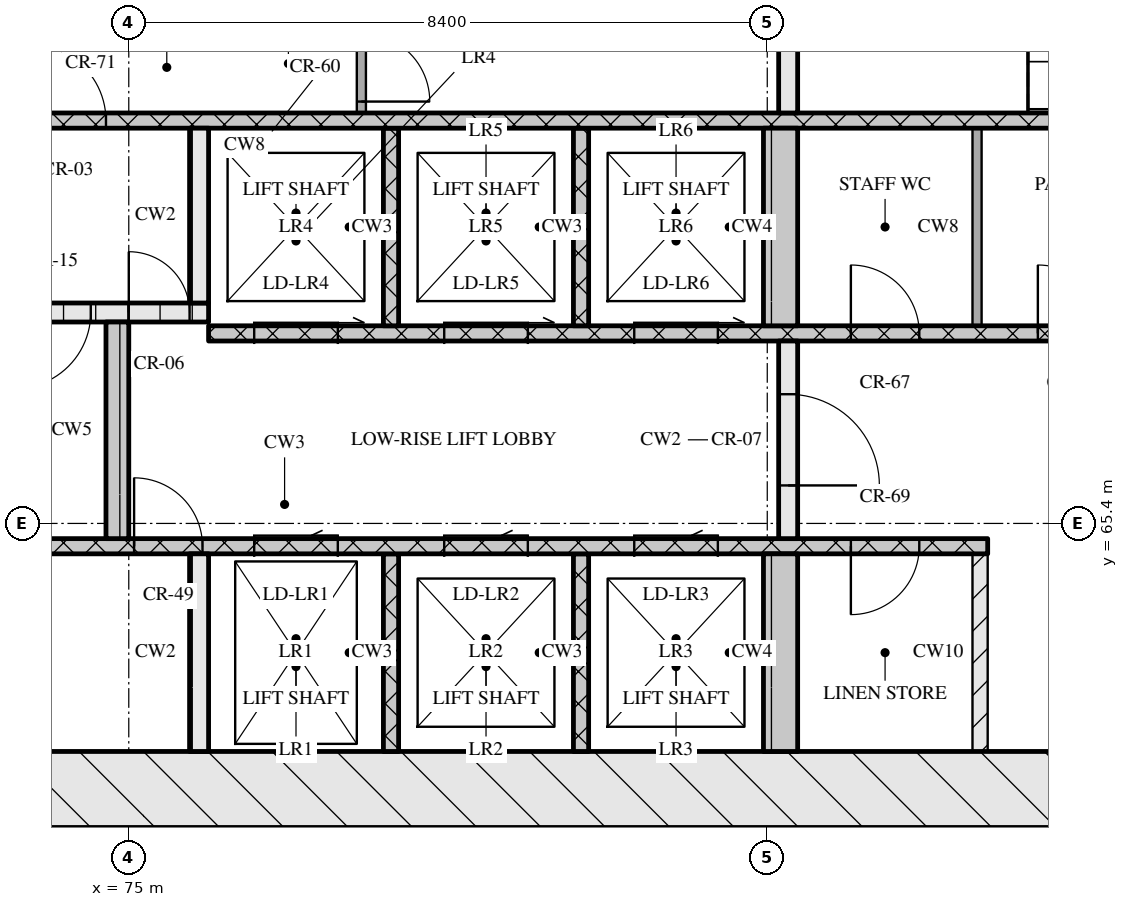
"""IFC4 building model, lengths in metres.
Left out: names, types, materials, properties, quantities, classifications, styles, units other than length and angle.
Written with IfcOpenShell. Run it as: python <this file> out.ifc"""

import sys

from ifc_helpers import new_model, si_unit, direction, frame, frame_2d, origin, place, context, subcontext, project, spatial, rectangle, extrude, element, fill, save


model = new_model("IFC4")
c1 = context("Model", 3, precision=1e-05, world=origin(), true_north=direction((0.0, 1.0)))
c2 = subcontext(c1, "Body", "Model", "MODEL_VIEW")
j1 = project(units=[si_unit("LENGTHUNIT", "METRE"), si_unit("PLANEANGLEUNIT", "RADIAN")], contexts=[c1])
p1 = place(None, origin())
s1 = spatial("IfcSite", under=j1, at=p1, CompositionType="ELEMENT")
p2 = place(p1, origin())
s2 = spatial("IfcBuilding", under=s1, at=p2, CompositionType="ELEMENT")
p3 = place(p2, frame((0.0, 0.0, 134.85)))
s3 = spatial("IfcBuildingStorey", under=s2, at=p3, CompositionType="ELEMENT", Elevation=134.85)
p4 = place(p3, frame((66.8, 61.9, 0.0), z_axis=(0.0, 0.0, 1.0), x_axis=(1.0, 0.0, 0.0)))
e1 = element("IfcWall", 1, at=p4, inside=s3, PredefinedType="SOLIDWALL", context=c2, shape_type="SweptSolid", body=[
    extrude(rectangle(XDim=41.6, YDim=1.0, at=frame_2d((20.8, 0.0))), origin(), (0.0, 0.0, 1.0), 3.32),
])
p5 = place(p4, frame((21.15, 0.0, 0.0)))
e2 = element("IfcOpeningElement", 2, at=p5, cuts=e1, PredefinedType="OPENING", context=c2, shape_type="SweptSolid", body=[
    extrude(rectangle(XDim=1.8, YDim=2.1, at=frame_2d((0.9, 1.05))), frame((0.0, 0.51, 0.0), z_axis=(0.0, -1.0, 0.0), x_axis=(1.0, 0.0, 0.0)), (0.0, 0.0, 1.0), 1.02),
])
p6 = place(p3, frame((75.925, 62.4, 0.0), z_axis=(0.0, 0.0, 1.0), x_axis=(0.0, 1.0, 0.0)))
e3 = element("IfcWall", 3, at=p6, inside=s3, PredefinedType="SOLIDWALL", context=c2, shape_type="SweptSolid", body=[
    extrude(rectangle(XDim=2.6, YDim=0.25, at=frame_2d((1.3, 0.0))), origin(), (0.0, 0.0, 1.0), 3.32),
])
for number, where, z_axis, x_axis in (
    (4, (78.45, 62.4, 0.0), (0.0, 0.0, 1.0), (0.0, 1.0, 0.0)),
    (5, (80.95, 62.4, 0.0), (0.0, 0.0, 1.0), (0.0, 1.0, 0.0)),
):
    element("IfcWall", number, at=place(p3, frame(where, z_axis=z_axis, x_axis=x_axis)), inside=s3, PredefinedType="SOLIDWALL", context=c2, shape_type="SweptSolid", body=[
        extrude(rectangle(XDim=2.6, YDim=0.2, at=frame_2d((1.3, 0.0))), origin(), (0.0, 0.0, 1.0), 3.32),
    ])
p7 = place(p3, frame((83.575, 62.4, 0.0), z_axis=(0.0, 0.0, 1.0), x_axis=(0.0, 1.0, 0.0)))
e6 = element("IfcWall", 6, at=p7, inside=s3, PredefinedType="SOLIDWALL", context=c2, shape_type="SweptSolid", body=[
    extrude(rectangle(XDim=2.6, YDim=0.45, at=frame_2d((1.3, 0.0))), origin(), (0.0, 0.0, 1.0), 3.32),
])
p8 = place(p3, frame((86.2, 62.4, 0.0), z_axis=(0.0, 0.0, 1.0), x_axis=(0.0, 1.0, 0.0)))
e7 = element("IfcWall", 7, at=p8, inside=s3, PredefinedType="PARTITIONING", context=c2, shape_type="SweptSolid", body=[
    extrude(rectangle(XDim=2.6, YDim=0.2, at=frame_2d((1.3, 0.0))), origin(), (0.0, 0.0, 1.0), 3.32),
])
p9 = place(p3, frame((67.8, 65.1, 0.0), z_axis=(0.0, 0.0, 1.0), x_axis=(1.0, 0.0, 0.0)))
e8 = element("IfcWall", 8, at=p9, inside=s3, PredefinedType="SOLIDWALL", context=c2, shape_type="SweptSolid", body=[
    extrude(rectangle(XDim=18.5, YDim=0.2, at=frame_2d((9.25, 0.0))), origin(), (0.0, 0.0, 1.0), 3.32),
])
p10 = place(p9, frame((7.27, 0.0, 0.0)))
e9 = element("IfcOpeningElement", 9, at=p10, cuts=e8, PredefinedType="OPENING", context=c2, shape_type="SweptSolid", body=[
    extrude(rectangle(XDim=0.9, YDim=2.1, at=frame_2d((0.45, 1.05))), frame((0.0, 0.11, 0.0), z_axis=(0.0, -1.0, 0.0), x_axis=(1.0, 0.0, 0.0)), (0.0, 0.0, 1.0), 0.22),
])
p11 = place(p9, frame((8.85, 0.0, 0.0)))
e10 = element("IfcOpeningElement", 10, at=p11, cuts=e8, PredefinedType="OPENING", context=c2, shape_type="SweptSolid", body=[
    extrude(rectangle(XDim=1.1, YDim=2.1, at=frame_2d((0.55, 1.05))), frame((0.0, 0.11, 0.0), z_axis=(0.0, -1.0, 0.0), x_axis=(1.0, 0.0, 0.0)), (0.0, 0.0, 1.0), 0.22),
])
p12 = place(p9, frame((11.35, 0.0, 0.0)))
e11 = element("IfcOpeningElement", 11, at=p12, cuts=e8, PredefinedType="OPENING", context=c2, shape_type="SweptSolid", body=[
    extrude(rectangle(XDim=1.1, YDim=2.1, at=frame_2d((0.55, 1.05))), frame((0.0, 0.11, 0.0), z_axis=(0.0, -1.0, 0.0), x_axis=(1.0, 0.0, 0.0)), (0.0, 0.0, 1.0), 0.22),
])
p13 = place(p9, frame((13.85, 0.0, 0.0)))
e12 = element("IfcOpeningElement", 12, at=p13, cuts=e8, PredefinedType="OPENING", context=c2, shape_type="SweptSolid", body=[
    extrude(rectangle(XDim=1.1, YDim=2.1, at=frame_2d((0.55, 1.05))), frame((0.0, 0.11, 0.0), z_axis=(0.0, -1.0, 0.0), x_axis=(1.0, 0.0, 0.0)), (0.0, 0.0, 1.0), 0.22),
])
p14 = place(p9, frame((16.7, 0.0, 0.0)))
e13 = element("IfcOpeningElement", 13, at=p14, cuts=e8, PredefinedType="OPENING", context=c2, shape_type="SweptSolid", body=[
    extrude(rectangle(XDim=0.9, YDim=2.1, at=frame_2d((0.45, 1.05))), frame((0.0, 0.11, 0.0), z_axis=(0.0, -1.0, 0.0), x_axis=(1.0, 0.0, 0.0)), (0.0, 0.0, 1.0), 0.22),
])
p15 = place(p3, frame((74.85, 65.2, 0.0), z_axis=(0.0, 0.0, 1.0), x_axis=(0.0, 1.0, 0.0)))
e14 = element("IfcWall", 14, at=p15, inside=s3, PredefinedType="SOLIDWALL", context=c2, shape_type="SweptSolid", body=[
    extrude(rectangle(XDim=2.85, YDim=0.3, at=frame_2d((1.425, 0.0))), origin(), (0.0, 0.0, 1.0), 3.32),
])
p16 = place(p3, frame((83.675, 65.2, 0.0), z_axis=(0.0, 0.0, 1.0), x_axis=(0.0, 1.0, 0.0)))
e15 = element("IfcWall", 15, at=p16, inside=s3, PredefinedType="SOLIDWALL", context=c2, shape_type="SweptSolid", body=[
    extrude(rectangle(XDim=2.6, YDim=0.25, at=frame_2d((1.3, 0.0))), origin(), (0.0, 0.0, 1.0), 3.32),
])
p17 = place(p16, frame((0.7, 0.0, 0.0)))
e16 = element("IfcOpeningElement", 16, at=p17, cuts=e15, PredefinedType="OPENING", context=c2, shape_type="SweptSolid", body=[
    extrude(rectangle(XDim=1.2, YDim=2.1, at=frame_2d((0.6, 1.05))), frame((0.0, 0.135, 0.0), z_axis=(0.0, -1.0, 0.0), x_axis=(1.0, 0.0, 0.0)), (0.0, 0.0, 1.0), 0.27),
])
p18 = place(p3, frame((76.05, 67.9, 0.0), z_axis=(0.0, 0.0, 1.0), x_axis=(1.0, 0.0, 0.0)))
e17 = element("IfcWall", 17, at=p18, inside=s3, PredefinedType="SOLIDWALL", context=c2, shape_type="SweptSolid", body=[
    extrude(rectangle(XDim=23.1, YDim=0.2, at=frame_2d((11.55, 0.0))), origin(), (0.0, 0.0, 1.0), 3.32),
])
p19 = place(p18, frame((0.6, 0.0, 0.0)))
e18 = element("IfcOpeningElement", 18, at=p19, cuts=e17, PredefinedType="OPENING", context=c2, shape_type="SweptSolid", body=[
    extrude(rectangle(XDim=1.1, YDim=2.1, at=frame_2d((0.55, 1.05))), frame((0.0, 0.11, 0.0), z_axis=(0.0, -1.0, 0.0), x_axis=(1.0, 0.0, 0.0)), (0.0, 0.0, 1.0), 0.22),
])
p20 = place(p18, frame((3.1, 0.0, 0.0)))
e19 = element("IfcOpeningElement", 19, at=p20, cuts=e17, PredefinedType="OPENING", context=c2, shape_type="SweptSolid", body=[
    extrude(rectangle(XDim=1.1, YDim=2.1, at=frame_2d((0.55, 1.05))), frame((0.0, 0.11, 0.0), z_axis=(0.0, -1.0, 0.0), x_axis=(1.0, 0.0, 0.0)), (0.0, 0.0, 1.0), 0.22),
])
p21 = place(p18, frame((5.6, 0.0, 0.0)))
e20 = element("IfcOpeningElement", 20, at=p21, cuts=e17, PredefinedType="OPENING", context=c2, shape_type="SweptSolid", body=[
    extrude(rectangle(XDim=1.1, YDim=2.1, at=frame_2d((0.55, 1.05))), frame((0.0, 0.11, 0.0), z_axis=(0.0, -1.0, 0.0), x_axis=(1.0, 0.0, 0.0)), (0.0, 0.0, 1.0), 0.22),
])
p22 = place(p18, frame((8.45, 0.0, 0.0)))
e21 = element("IfcOpeningElement", 21, at=p22, cuts=e17, PredefinedType="OPENING", context=c2, shape_type="SweptSolid", body=[
    extrude(rectangle(XDim=0.9, YDim=2.1, at=frame_2d((0.45, 1.05))), frame((0.0, 0.11, 0.0), z_axis=(0.0, -1.0, 0.0), x_axis=(1.0, 0.0, 0.0)), (0.0, 0.0, 1.0), 0.22),
])
p23 = place(p18, frame((10.91, 0.0, 0.0)))
e22 = element("IfcOpeningElement", 22, at=p23, cuts=e17, PredefinedType="OPENING", context=c2, shape_type="SweptSolid", body=[
    extrude(rectangle(XDim=0.9, YDim=2.1, at=frame_2d((0.45, 1.05))), frame((0.0, 0.11, 0.0), z_axis=(0.0, -1.0, 0.0), x_axis=(1.0, 0.0, 0.0)), (0.0, 0.0, 1.0), 0.22),
])
p24 = place(p18, frame((13.55, 0.0, 0.0)))
e23 = element("IfcOpeningElement", 23, at=p24, cuts=e17, PredefinedType="OPENING", context=c2, shape_type="SweptSolid", body=[
    extrude(rectangle(XDim=1.0, YDim=2.1, at=frame_2d((0.5, 1.05))), frame((0.0, 0.11, 0.0), z_axis=(0.0, -1.0, 0.0), x_axis=(1.0, 0.0, 0.0)), (0.0, 0.0, 1.0), 0.22),
])
for number, where, z_axis, x_axis in (
    (24, (78.45, 68.0, 0.0), (0.0, 0.0, 1.0), (0.0, 1.0, 0.0)),
    (25, (80.95, 68.0, 0.0), (0.0, 0.0, 1.0), (0.0, 1.0, 0.0)),
):
    element("IfcWall", number, at=place(p3, frame(where, z_axis=z_axis, x_axis=x_axis)), inside=s3, PredefinedType="SOLIDWALL", context=c2, shape_type="SweptSolid", body=[
        extrude(rectangle(XDim=2.6, YDim=0.2, at=frame_2d((1.3, 0.0))), origin(), (0.0, 0.0, 1.0), 3.32),
    ])
p25 = place(p3, frame((83.575, 68.0, 0.0), z_axis=(0.0, 0.0, 1.0), x_axis=(0.0, 1.0, 0.0)))
e26 = element("IfcWall", 26, at=p25, inside=s3, PredefinedType="SOLIDWALL", context=c2, shape_type="SweptSolid", body=[
    extrude(rectangle(XDim=2.6, YDim=0.45, at=frame_2d((1.3, 0.0))), origin(), (0.0, 0.0, 1.0), 3.32),
])
p26 = place(p3, frame((86.16, 68.0, 0.0), z_axis=(0.0, 0.0, 1.0), x_axis=(0.0, 1.0, 0.0)))
e27 = element("IfcWall", 27, at=p26, inside=s3, PredefinedType="PARTITIONING", context=c2, shape_type="SweptSolid", body=[
    extrude(rectangle(XDim=2.6, YDim=0.12, at=frame_2d((1.3, 0.0))), origin(), (0.0, 0.0, 1.0), 3.32),
])
p27 = place(p3, frame((67.8, 68.175, 0.0), z_axis=(0.0, 0.0, 1.0), x_axis=(1.0, 0.0, 0.0)))
e28 = element("IfcWall", 28, at=p27, inside=s3, PredefinedType="SOLIDWALL", context=c2, shape_type="SweptSolid", body=[
    extrude(rectangle(XDim=8.25, YDim=0.25, at=frame_2d((4.125, 0.0))), origin(), (0.0, 0.0, 1.0), 3.32),
])
p28 = place(p27, frame((5.7, 0.0, 0.0)))
e29 = element("IfcOpeningElement", 29, at=p28, cuts=e28, PredefinedType="OPENING", context=c2, shape_type="SweptSolid", body=[
    extrude(rectangle(XDim=1.0, YDim=2.1, at=frame_2d((0.5, 1.05))), frame((0.0, 0.135, 0.0), z_axis=(0.0, -1.0, 0.0), x_axis=(1.0, 0.0, 0.0)), (0.0, 0.0, 1.0), 0.27),
])
p29 = place(p27, frame((7.2, 0.0, 0.0)))
e30 = element("IfcOpeningElement", 30, at=p29, cuts=e28, PredefinedType="OPENING", context=c2, shape_type="SweptSolid", body=[
    extrude(rectangle(XDim=0.8, YDim=2.1, at=frame_2d((0.4, 1.05))), frame((0.0, 0.135, 0.0), z_axis=(0.0, -1.0, 0.0), x_axis=(1.0, 0.0, 0.0)), (0.0, 0.0, 1.0), 0.27),
])
p30 = place(p3, frame((75.925, 68.3, 0.0), z_axis=(0.0, 0.0, 1.0), x_axis=(0.0, 1.0, 0.0)))
e31 = element("IfcWall", 31, at=p30, inside=s3, PredefinedType="SOLIDWALL", context=c2, shape_type="SweptSolid", body=[
    extrude(rectangle(XDim=2.3, YDim=0.25, at=frame_2d((1.15, 0.0))), origin(), (0.0, 0.0, 1.0), 3.32),
])
p31 = place(p3, frame((67.8, 70.7, 0.0), z_axis=(0.0, 0.0, 1.0), x_axis=(1.0, 0.0, 0.0)))
e32 = element("IfcWall", 32, at=p31, inside=s3, PredefinedType="SOLIDWALL", context=c2, shape_type="SweptSolid", body=[
    extrude(rectangle(XDim=39.6, YDim=0.2, at=frame_2d((19.8, 0.0))), origin(), (0.0, 0.0, 1.0), 3.32),
])
p32 = place(p31, frame((0.65, 0.0, 0.0)))
e33 = element("IfcOpeningElement", 33, at=p32, cuts=e32, PredefinedType="OPENING", context=c2, shape_type="SweptSolid", body=[
    extrude(rectangle(XDim=1.1, YDim=2.1, at=frame_2d((0.55, 1.05))), frame((0.0, 0.11, 0.0), z_axis=(0.0, -1.0, 0.0), x_axis=(1.0, 0.0, 0.0)), (0.0, 0.0, 1.0), 0.22),
])
p33 = place(p31, frame((3.25, 0.0, 0.0)))
e34 = element("IfcOpeningElement", 34, at=p33, cuts=e32, PredefinedType="OPENING", context=c2, shape_type="SweptSolid", body=[
    extrude(rectangle(XDim=1.1, YDim=2.1, at=frame_2d((0.55, 1.05))), frame((0.0, 0.11, 0.0), z_axis=(0.0, -1.0, 0.0), x_axis=(1.0, 0.0, 0.0)), (0.0, 0.0, 1.0), 0.22),
])
p34 = place(p31, frame((5.9, 0.0, 0.0)))
e35 = element("IfcOpeningElement", 35, at=p34, cuts=e32, PredefinedType="OPENING", context=c2, shape_type="SweptSolid", body=[
    extrude(rectangle(XDim=1.0, YDim=2.1, at=frame_2d((0.5, 1.05))), frame((0.0, 0.11, 0.0), z_axis=(0.0, -1.0, 0.0), x_axis=(1.0, 0.0, 0.0)), (0.0, 0.0, 1.0), 0.22),
])
p35 = place(p31, frame((21.7, 0.0, 0.0)))
e36 = element("IfcOpeningElement", 36, at=p35, cuts=e32, PredefinedType="OPENING", context=c2, shape_type="SweptSolid", body=[
    extrude(rectangle(XDim=1.0, YDim=2.1, at=frame_2d((0.5, 1.05))), frame((0.0, 0.11, 0.0), z_axis=(0.0, -1.0, 0.0), x_axis=(1.0, 0.0, 0.0)), (0.0, 0.0, 1.0), 0.22),
])
p36 = place(p31, frame((32.7, 0.0, 0.0)))
e37 = element("IfcOpeningElement", 37, at=p36, cuts=e32, PredefinedType="OPENING", context=c2, shape_type="SweptSolid", body=[
    extrude(rectangle(XDim=1.0, YDim=2.1, at=frame_2d((0.5, 1.05))), frame((0.0, 0.11, 0.0), z_axis=(0.0, -1.0, 0.0), x_axis=(1.0, 0.0, 0.0)), (0.0, 0.0, 1.0), 0.22),
])
p37 = place(p31, frame((35.25, 0.0, 0.0)))
e38 = element("IfcOpeningElement", 38, at=p37, cuts=e32, PredefinedType="OPENING", context=c2, shape_type="SweptSolid", body=[
    extrude(rectangle(XDim=1.1, YDim=2.1, at=frame_2d((0.55, 1.05))), frame((0.0, 0.11, 0.0), z_axis=(0.0, -1.0, 0.0), x_axis=(1.0, 0.0, 0.0)), (0.0, 0.0, 1.0), 0.22),
])
p38 = place(p31, frame((37.85, 0.0, 0.0)))
e39 = element("IfcOpeningElement", 39, at=p38, cuts=e32, PredefinedType="OPENING", context=c2, shape_type="SweptSolid", body=[
    extrude(rectangle(XDim=1.1, YDim=2.1, at=frame_2d((0.55, 1.05))), frame((0.0, 0.11, 0.0), z_axis=(0.0, -1.0, 0.0), x_axis=(1.0, 0.0, 0.0)), (0.0, 0.0, 1.0), 0.22),
])
p39 = place(p3, frame((78.06, 70.8, 0.0), z_axis=(0.0, 0.0, 1.0), x_axis=(0.0, 1.0, 0.0)))
e40 = element("IfcWall", 40, at=p39, inside=s3, PredefinedType="PARTITIONING", context=c2, shape_type="SweptSolid", body=[
    extrude(rectangle(XDim=1.2, YDim=0.12, at=frame_2d((0.6, 0.0))), origin(), (0.0, 0.0, 1.0), 3.32),
])
p40 = place(p39, frame((0.15, 0.0, 0.0)))
e41 = element("IfcOpeningElement", 41, at=p40, cuts=e40, PredefinedType="OPENING", context=c2, shape_type="SweptSolid", body=[
    extrude(rectangle(XDim=0.9, YDim=2.1, at=frame_2d((0.45, 1.05))), frame((0.0, 0.07, 0.0), z_axis=(0.0, -1.0, 0.0), x_axis=(1.0, 0.0, 0.0)), (0.0, 0.0, 1.0), 0.14),
])
p41 = place(p3, frame((83.675, 70.8, 0.0), z_axis=(0.0, 0.0, 1.0), x_axis=(0.0, 1.0, 0.0)))
e42 = element("IfcWall", 42, at=p41, inside=s3, PredefinedType="SOLIDWALL", context=c2, shape_type="SweptSolid", body=[
    extrude(rectangle(XDim=2.95, YDim=0.25, at=frame_2d((1.475, 0.0))), origin(), (0.0, 0.0, 1.0), 3.32),
])
p42 = place(p10, origin())
e43 = element("IfcDoor", 43, at=p42, inside=s3, OperationType="SINGLE_SWING_LEFT", PredefinedType="DOOR", context=c2, shape_type="SweptSolid", body=[
    extrude(rectangle(XDim=0.9, YDim=2.1, at=frame_2d((0.45, 1.05))), frame((0.0, 0.025, 0.0), z_axis=(0.0, -1.0, 0.0), x_axis=(1.0, 0.0, 0.0)), (0.0, 0.0, 1.0), 0.05),
])
fill(e9, e43)
p43 = place(p11, origin())
e44 = element("IfcDoor", 44, at=p43, inside=s3, OperationType="SLIDING_TO_LEFT", PredefinedType="DOOR", context=c2, shape_type="SweptSolid", body=[
    extrude(rectangle(XDim=1.1, YDim=2.1, at=frame_2d((0.55, 1.05))), frame((0.0, 0.025, 0.0), z_axis=(0.0, -1.0, 0.0), x_axis=(1.0, 0.0, 0.0)), (0.0, 0.0, 1.0), 0.05),
])
fill(e10, e44)
p44 = place(p12, origin())
e45 = element("IfcDoor", 45, at=p44, inside=s3, OperationType="SLIDING_TO_LEFT", PredefinedType="DOOR", context=c2, shape_type="SweptSolid", body=[
    extrude(rectangle(XDim=1.1, YDim=2.1, at=frame_2d((0.55, 1.05))), frame((0.0, 0.025, 0.0), z_axis=(0.0, -1.0, 0.0), x_axis=(1.0, 0.0, 0.0)), (0.0, 0.0, 1.0), 0.05),
])
fill(e11, e45)
p45 = place(p13, origin())
e46 = element("IfcDoor", 46, at=p45, inside=s3, OperationType="SLIDING_TO_LEFT", PredefinedType="DOOR", context=c2, shape_type="SweptSolid", body=[
    extrude(rectangle(XDim=1.1, YDim=2.1, at=frame_2d((0.55, 1.05))), frame((0.0, 0.025, 0.0), z_axis=(0.0, -1.0, 0.0), x_axis=(1.0, 0.0, 0.0)), (0.0, 0.0, 1.0), 0.05),
])
fill(e12, e46)
p46 = place(p14, origin())
e47 = element("IfcDoor", 47, at=p46, inside=s3, OperationType="SINGLE_SWING_RIGHT", PredefinedType="DOOR", context=c2, shape_type="SweptSolid", body=[
    extrude(rectangle(XDim=0.9, YDim=2.1, at=frame_2d((0.45, 1.05))), frame((0.0, 0.025, 0.0), z_axis=(0.0, -1.0, 0.0), x_axis=(1.0, 0.0, 0.0)), (0.0, 0.0, 1.0), 0.05),
])
fill(e13, e47)
p47 = place(p17, origin())
e48 = element("IfcDoor", 48, at=p47, inside=s3, OperationType="SINGLE_SWING_RIGHT", PredefinedType="DOOR", context=c2, shape_type="SweptSolid", body=[
    extrude(rectangle(XDim=1.2, YDim=2.1, at=frame_2d((0.6, 1.05))), frame((0.0, 0.025, 0.0), z_axis=(0.0, -1.0, 0.0), x_axis=(1.0, 0.0, 0.0)), (0.0, 0.0, 1.0), 0.05),
])
fill(e16, e48)
p48 = place(p19, origin())
e49 = element("IfcDoor", 49, at=p48, inside=s3, OperationType="SLIDING_TO_RIGHT", PredefinedType="DOOR", context=c2, shape_type="SweptSolid", body=[
    extrude(rectangle(XDim=1.1, YDim=2.1, at=frame_2d((0.55, 1.05))), frame((0.0, 0.025, 0.0), z_axis=(0.0, -1.0, 0.0), x_axis=(1.0, 0.0, 0.0)), (0.0, 0.0, 1.0), 0.05),
])
fill(e18, e49)
p49 = place(p20, origin())
e50 = element("IfcDoor", 50, at=p49, inside=s3, OperationType="SLIDING_TO_RIGHT", PredefinedType="DOOR", context=c2, shape_type="SweptSolid", body=[
    extrude(rectangle(XDim=1.1, YDim=2.1, at=frame_2d((0.55, 1.05))), frame((0.0, 0.025, 0.0), z_axis=(0.0, -1.0, 0.0), x_axis=(1.0, 0.0, 0.0)), (0.0, 0.0, 1.0), 0.05),
])
fill(e19, e50)
p50 = place(p21, origin())
e51 = element("IfcDoor", 51, at=p50, inside=s3, OperationType="SLIDING_TO_RIGHT", PredefinedType="DOOR", context=c2, shape_type="SweptSolid", body=[
    extrude(rectangle(XDim=1.1, YDim=2.1, at=frame_2d((0.55, 1.05))), frame((0.0, 0.025, 0.0), z_axis=(0.0, -1.0, 0.0), x_axis=(1.0, 0.0, 0.0)), (0.0, 0.0, 1.0), 0.05),
])
fill(e20, e51)
p51 = place(p22, origin())
e52 = element("IfcDoor", 52, at=p51, inside=s3, OperationType="SINGLE_SWING_LEFT", PredefinedType="DOOR", context=c2, shape_type="SweptSolid", body=[
    extrude(rectangle(XDim=0.9, YDim=2.1, at=frame_2d((0.45, 1.05))), frame((0.0, 0.025, 0.0), z_axis=(0.0, -1.0, 0.0), x_axis=(1.0, 0.0, 0.0)), (0.0, 0.0, 1.0), 0.05),
])
fill(e21, e52)
p52 = place(p23, origin())
e53 = element("IfcDoor", 53, at=p52, inside=s3, OperationType="SINGLE_SWING_LEFT", PredefinedType="DOOR", context=c2, shape_type="SweptSolid", body=[
    extrude(rectangle(XDim=0.9, YDim=2.1, at=frame_2d((0.45, 1.05))), frame((0.0, 0.025, 0.0), z_axis=(0.0, -1.0, 0.0), x_axis=(1.0, 0.0, 0.0)), (0.0, 0.0, 1.0), 0.05),
])
fill(e22, e53)
p53 = place(p28, origin())
e54 = element("IfcDoor", 54, at=p53, inside=s3, OperationType="SINGLE_SWING_RIGHT", PredefinedType="DOOR", context=c2, shape_type="SweptSolid", body=[
    extrude(rectangle(XDim=1.0, YDim=2.1, at=frame_2d((0.5, 1.05))), frame((0.0, 0.025, 0.0), z_axis=(0.0, -1.0, 0.0), x_axis=(1.0, 0.0, 0.0)), (0.0, 0.0, 1.0), 0.05),
])
fill(e29, e54)
p54 = place(p29, origin())
e55 = element("IfcDoor", 55, at=p54, inside=s3, OperationType="SINGLE_SWING_LEFT", PredefinedType="DOOR", context=c2, shape_type="SweptSolid", body=[
    extrude(rectangle(XDim=0.8, YDim=2.1, at=frame_2d((0.4, 1.05))), frame((0.0, 0.025, 0.0), z_axis=(0.0, -1.0, 0.0), x_axis=(1.0, 0.0, 0.0)), (0.0, 0.0, 1.0), 0.05),
])
fill(e30, e55)
p55 = place(p34, origin())
e56 = element("IfcDoor", 56, at=p55, inside=s3, OperationType="SINGLE_SWING_LEFT", PredefinedType="DOOR", context=c2, shape_type="SweptSolid", body=[
    extrude(rectangle(XDim=1.0, YDim=2.1, at=frame_2d((0.5, 1.05))), frame((0.0, 0.025, 0.0), z_axis=(0.0, -1.0, 0.0), x_axis=(1.0, 0.0, 0.0)), (0.0, 0.0, 1.0), 0.05),
])
fill(e35, e56)
p56 = place(p40, origin())
e57 = element("IfcDoor", 57, at=p56, inside=s3, OperationType="SINGLE_SWING_RIGHT", PredefinedType="DOOR", context=c2, shape_type="SweptSolid", body=[
    extrude(rectangle(XDim=0.9, YDim=2.1, at=frame_2d((0.45, 1.05))), frame((0.0, 0.025, 0.0), z_axis=(0.0, -1.0, 0.0), x_axis=(1.0, 0.0, 0.0)), (0.0, 0.0, 1.0), 0.05),
])
fill(e41, e57)
save(model, sys.argv[1])
